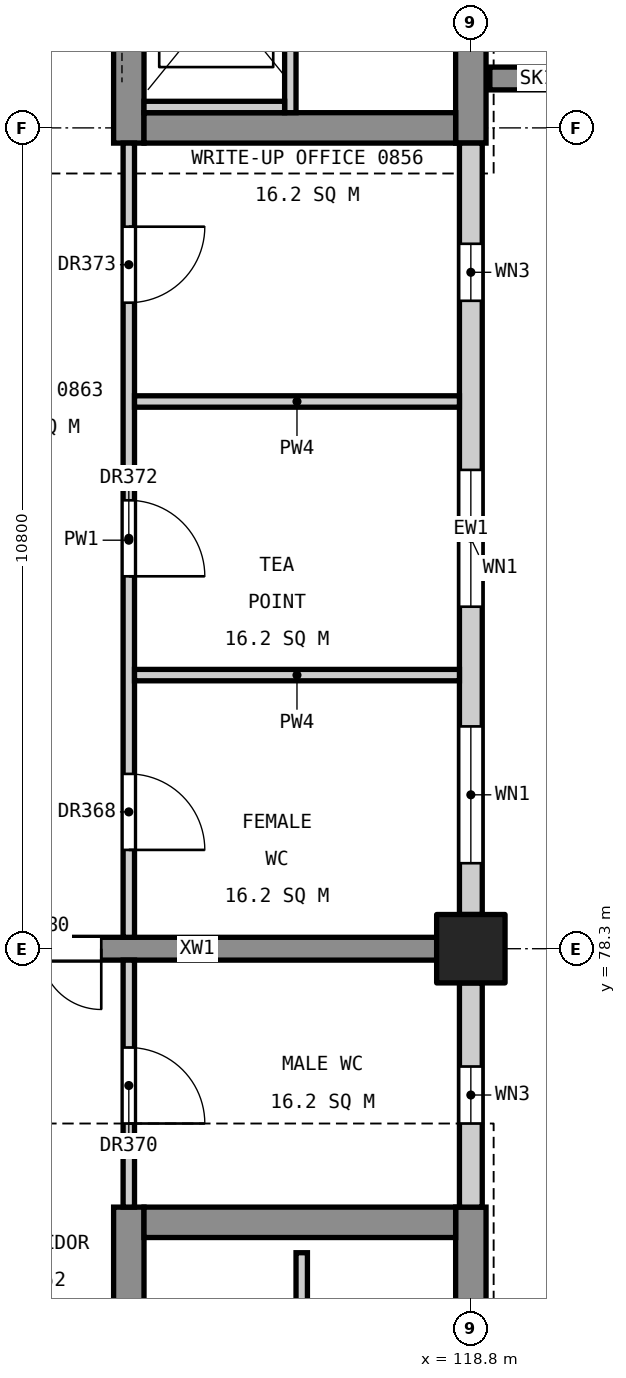
"""IFC4 building model, lengths in metres.
Left out: names, types, materials, properties, quantities, classifications, styles, units other than length and angle.
Written with IfcOpenShell. Run it as: python <this file> out.ifc"""

import sys

from ifc_helpers import new_model, si_unit, direction, frame, frame_2d, origin, origin_2d, place, context, subcontext, project, spatial, rectangle, extrude, element, fill, save


model = new_model("IFC4")
c1 = context("Model", 3, precision=1e-05, world=origin(), true_north=direction((0.0, 1.0)))
c2 = subcontext(c1, "Body", "Model", "MODEL_VIEW")
j1 = project(units=[si_unit("LENGTHUNIT", "METRE"), si_unit("PLANEANGLEUNIT", "RADIAN")], contexts=[c1])
p1 = place(None, origin())
s1 = spatial("IfcSite", under=j1, at=p1, CompositionType="ELEMENT")
p2 = place(p1, origin())
s2 = spatial("IfcBuilding", under=s1, at=p2, CompositionType="ELEMENT")
p3 = place(p2, frame((0.0, 0.0, 41.4)))
s3 = spatial("IfcBuildingStorey", under=s2, at=p3, CompositionType="ELEMENT", Elevation=41.4)
p4 = place(p3, frame((118.8, 78.3, 0.0), z_axis=(0.0, 0.0, 1.0), x_axis=(1.0, 0.0, 0.0)))
e1 = element("IfcColumn", 1, at=p4, inside=s3, PredefinedType="COLUMN", context=c2, shape_type="SweptSolid", body=[
    extrude(rectangle(XDim=0.9, YDim=0.9, at=origin_2d()), origin(), (0.0, 0.0, 1.0), 4.8),
])
p5 = place(p3, frame((118.8, 60.1, 0.0), z_axis=(0.0, 0.0, 1.0), x_axis=(0.0, 1.0, 0.0)))
e2 = element("IfcWall", 2, at=p5, inside=s3, PredefinedType="SHEAR", context=c2, shape_type="SweptSolid", body=[
    extrude(rectangle(XDim=14.8, YDim=0.4, at=frame_2d((7.4, 0.0))), origin(), (0.0, 0.0, 1.0), 4.55),
])
p6 = place(p5, frame((6.11, 0.0, 3.4)))
e3 = element("IfcOpeningElement", 3, at=p6, cuts=e2, PredefinedType="OPENING", context=c2, shape_type="SweptSolid", body=[
    extrude(rectangle(XDim=1.2, YDim=0.9, at=frame_2d((0.6, 0.45))), frame((0.0, 0.21, 0.0), z_axis=(0.0, -1.0, 0.0), x_axis=(1.0, 0.0, 0.0)), (0.0, 0.0, 1.0), 0.42),
])
p7 = place(p3, frame((114.3, 60.1, 0.0), z_axis=(0.0, 0.0, 1.0), x_axis=(0.0, 1.0, 0.0)))
e4 = element("IfcWall", 4, at=p7, inside=s3, PredefinedType="SHEAR", context=c2, shape_type="SweptSolid", body=[
    extrude(rectangle(XDim=14.8, YDim=0.4, at=frame_2d((7.4, 0.0))), origin(), (0.0, 0.0, 1.0), 4.55),
])
p8 = place(p7, frame((0.5, 0.0, 0.0)))
e5 = element("IfcOpeningElement", 5, at=p8, cuts=e4, PredefinedType="OPENING", context=c2, shape_type="SweptSolid", body=[
    extrude(rectangle(XDim=1.4, YDim=2.1, at=frame_2d((0.7, 1.05))), frame((0.0, 0.21, 0.0), z_axis=(0.0, -1.0, 0.0), x_axis=(1.0, 0.0, 0.0)), (0.0, 0.0, 1.0), 0.42),
])
p9 = place(p7, frame((8.8, 0.0, 0.0)))
e6 = element("IfcOpeningElement", 6, at=p9, cuts=e4, PredefinedType="OPENING", context=c2, shape_type="SweptSolid", body=[
    extrude(rectangle(XDim=1.1, YDim=2.1, at=frame_2d((0.55, 1.05))), frame((0.0, 0.21, 0.0), z_axis=(0.0, -1.0, 0.0), x_axis=(1.0, 0.0, 0.0)), (0.0, 0.0, 1.0), 0.42),
])
p10 = place(p7, frame((11.35, 0.0, 0.0)))
e7 = element("IfcOpeningElement", 7, at=p10, cuts=e4, PredefinedType="OPENING", context=c2, shape_type="SweptSolid", body=[
    extrude(rectangle(XDim=1.1, YDim=2.1, at=frame_2d((0.55, 1.05))), frame((0.0, 0.21, 0.0), z_axis=(0.0, -1.0, 0.0), x_axis=(1.0, 0.0, 0.0)), (0.0, 0.0, 1.0), 0.42),
])
p11 = place(p3, frame((118.6, 74.7, 0.0), z_axis=(0.0, 0.0, 1.0), x_axis=(-1.0, 0.0, 0.0)))
e8 = element("IfcWall", 8, at=p11, inside=s3, PredefinedType="SHEAR", context=c2, shape_type="SweptSolid", body=[
    extrude(rectangle(XDim=4.1, YDim=0.4, at=frame_2d((2.05, 0.0))), origin(), (0.0, 0.0, 1.0), 4.55),
])
p12 = place(p3, frame((118.8, 88.9, 0.0), z_axis=(0.0, 0.0, 1.0), x_axis=(0.0, 1.0, 0.0)))
e9 = element("IfcWall", 9, at=p12, inside=s3, PredefinedType="SHEAR", context=c2, shape_type="SweptSolid", body=[
    extrude(rectangle(XDim=11.2, YDim=0.4, at=frame_2d((5.6, 0.0))), origin(), (0.0, 0.0, 1.0), 4.55),
])
p13 = place(p12, frame((3.89, 0.0, 3.4)))
e10 = element("IfcOpeningElement", 10, at=p13, cuts=e9, PredefinedType="OPENING", context=c2, shape_type="SweptSolid", body=[
    extrude(rectangle(XDim=1.2, YDim=0.9, at=frame_2d((0.6, 0.45))), frame((0.0, 0.21, 0.0), z_axis=(0.0, -1.0, 0.0), x_axis=(1.0, 0.0, 0.0)), (0.0, 0.0, 1.0), 0.42),
])
p14 = place(p3, frame((114.3, 88.9, 0.0), z_axis=(0.0, 0.0, 1.0), x_axis=(0.0, 1.0, 0.0)))
e11 = element("IfcWall", 11, at=p14, inside=s3, PredefinedType="SHEAR", context=c2, shape_type="SweptSolid", body=[
    extrude(rectangle(XDim=11.2, YDim=0.4, at=frame_2d((5.6, 0.0))), origin(), (0.0, 0.0, 1.0), 4.55),
])
p15 = place(p14, frame((9.3, 0.0, 0.0)))
e12 = element("IfcOpeningElement", 12, at=p15, cuts=e11, PredefinedType="OPENING", context=c2, shape_type="SweptSolid", body=[
    extrude(rectangle(XDim=1.4, YDim=2.1, at=frame_2d((0.7, 1.05))), frame((0.0, 0.21, 0.0), z_axis=(0.0, -1.0, 0.0), x_axis=(1.0, 0.0, 0.0)), (0.0, 0.0, 1.0), 0.42),
])
p16 = place(p14, frame((1.35, 0.0, 0.0)))
e13 = element("IfcOpeningElement", 13, at=p16, cuts=e11, PredefinedType="OPENING", context=c2, shape_type="SweptSolid", body=[
    extrude(rectangle(XDim=1.1, YDim=2.1, at=frame_2d((0.55, 1.05))), frame((0.0, 0.21, 0.0), z_axis=(0.0, -1.0, 0.0), x_axis=(1.0, 0.0, 0.0)), (0.0, 0.0, 1.0), 0.42),
])
p17 = place(p3, frame((118.6, 89.1, 0.0), z_axis=(0.0, 0.0, 1.0), x_axis=(-1.0, 0.0, 0.0)))
e14 = element("IfcWall", 14, at=p17, inside=s3, PredefinedType="SHEAR", context=c2, shape_type="SweptSolid", body=[
    extrude(rectangle(XDim=4.1, YDim=0.4, at=frame_2d((2.05, 0.0))), origin(), (0.0, 0.0, 1.0), 4.55),
])
p18 = place(p3, frame((119.05, 89.75, 0.0), z_axis=(0.0, 0.0, 1.0), x_axis=(1.0, 0.0, 0.0)))
e15 = element("IfcWall", 15, at=p18, inside=s3, PredefinedType="SHEAR", context=c2, shape_type="SweptSolid", body=[
    extrude(rectangle(XDim=1.25, YDim=0.3, at=frame_2d((0.625, 0.0))), origin(), (0.0, 0.0, 1.0), 4.8),
])
p19 = place(p3, frame((118.35, 78.3, 0.0), z_axis=(0.0, 0.0, 1.0), x_axis=(-1.0, 0.0, 0.0)))
e16 = element("IfcWall", 16, at=p19, inside=s3, PredefinedType="SHEAR", context=c2, shape_type="SweptSolid", body=[
    extrude(rectangle(XDim=6.3, YDim=0.3, at=frame_2d((3.15, 0.0))), origin(), (0.0, 0.0, 1.0), 4.55),
])
p20 = place(p19, frame((4.413, 0.0, 0.0)))
e17 = element("IfcOpeningElement", 17, at=p20, cuts=e16, PredefinedType="OPENING", context=c2, shape_type="SweptSolid", body=[
    extrude(rectangle(XDim=1.6, YDim=2.1, at=frame_2d((0.8, 1.05))), frame((0.0, 0.16, 0.0), z_axis=(0.0, -1.0, 0.0), x_axis=(1.0, 0.0, 0.0)), (0.0, 0.0, 1.0), 0.32),
])
p21 = place(p3, frame((116.425, 92.0, 0.0), z_axis=(0.0, 0.0, 1.0), x_axis=(0.0, -1.0, 0.0)))
e18 = element("IfcWall", 18, at=p21, inside=s3, PredefinedType="SOLIDWALL", context=c2, shape_type="SweptSolid", body=[
    extrude(rectangle(XDim=2.7, YDim=0.15, at=frame_2d((1.35, 0.0))), origin(), (0.0, 0.0, 1.0), 4.55),
])
p22 = place(p3, frame((116.35, 89.375, 0.0), z_axis=(0.0, 0.0, 1.0), x_axis=(-1.0, 0.0, 0.0)))
e19 = element("IfcWall", 19, at=p22, inside=s3, PredefinedType="SOLIDWALL", context=c2, shape_type="SweptSolid", body=[
    extrude(rectangle(XDim=1.85, YDim=0.15, at=frame_2d((0.925, 0.0))), origin(), (0.0, 0.0, 1.0), 4.55),
])
p23 = place(p3, frame((116.575, 73.3, 0.0), z_axis=(0.0, 0.0, 1.0), x_axis=(0.0, 1.0, 0.0)))
e20 = element("IfcWall", 20, at=p23, inside=s3, PredefinedType="SOLIDWALL", context=c2, shape_type="SweptSolid", body=[
    extrude(rectangle(XDim=1.0, YDim=0.15, at=frame_2d((0.5, 0.0))), origin(), (0.0, 0.0, 1.0), 4.55),
])
p24 = place(p3, frame((118.8, 74.9, 0.0), z_axis=(0.0, 0.0, 1.0), x_axis=(0.0, 1.0, 0.0)))
e21 = element("IfcWall", 21, at=p24, inside=s3, PredefinedType="STANDARD", context=c2, shape_type="SweptSolid", body=[
    extrude(rectangle(XDim=2.95, YDim=0.3, at=frame_2d((1.475, 0.0))), origin(), (0.0, 0.0, 1.0), 3.65),
])
p25 = place(p24, frame((1.1, 0.0, 0.8)))
e22 = element("IfcOpeningElement", 22, at=p25, cuts=e21, PredefinedType="OPENING", context=c2, shape_type="SweptSolid", body=[
    extrude(rectangle(XDim=0.75, YDim=1.2, at=frame_2d((0.375, 0.6))), frame((0.0, 0.16, 0.0), z_axis=(0.0, -1.0, 0.0), x_axis=(1.0, 0.0, 0.0)), (0.0, 0.0, 1.0), 0.32),
])
p26 = place(p3, frame((118.8, 78.75, 0.0), z_axis=(0.0, 0.0, 1.0), x_axis=(0.0, 1.0, 0.0)))
e23 = element("IfcWall", 23, at=p26, inside=s3, PredefinedType="STANDARD", context=c2, shape_type="SweptSolid", body=[
    extrude(rectangle(XDim=10.15, YDim=0.3, at=frame_2d((5.075, 0.0))), origin(), (0.0, 0.0, 1.0), 3.65),
])
p27 = place(p26, frame((0.675, 0.0, 0.9)))
e24 = element("IfcOpeningElement", 24, at=p27, cuts=e23, PredefinedType="OPENING", context=c2, shape_type="SweptSolid", body=[
    extrude(rectangle(XDim=1.8, YDim=2.4, at=frame_2d((0.9, 1.2))), frame((0.0, 0.16, 0.0), z_axis=(0.0, -1.0, 0.0), x_axis=(1.0, 0.0, 0.0)), (0.0, 0.0, 1.0), 0.32),
])
p28 = place(p26, frame((4.05, 0.0, 0.9)))
e25 = element("IfcOpeningElement", 25, at=p28, cuts=e23, PredefinedType="OPENING", context=c2, shape_type="SweptSolid", body=[
    extrude(rectangle(XDim=1.8, YDim=2.4, at=frame_2d((0.9, 1.2))), frame((0.0, 0.16, 0.0), z_axis=(0.0, -1.0, 0.0), x_axis=(1.0, 0.0, 0.0)), (0.0, 0.0, 1.0), 0.32),
])
p29 = place(p26, frame((8.075, 0.0, 0.8)))
e26 = element("IfcOpeningElement", 26, at=p29, cuts=e23, PredefinedType="OPENING", context=c2, shape_type="SweptSolid", body=[
    extrude(rectangle(XDim=0.75, YDim=1.2, at=frame_2d((0.375, 0.6))), frame((0.0, 0.16, 0.0), z_axis=(0.0, -1.0, 0.0), x_axis=(1.0, 0.0, 0.0)), (0.0, 0.0, 1.0), 0.32),
])
p30 = place(p3, frame((114.3, 74.9, 0.0), z_axis=(0.0, 0.0, 1.0), x_axis=(0.0, 1.0, 0.0)))
e27 = element("IfcWall", 27, at=p30, inside=s3, PredefinedType="PARTITIONING", context=c2, shape_type="SweptSolid", body=[
    extrude(rectangle(XDim=3.25, YDim=0.15, at=frame_2d((1.625, 0.0))), origin(), (0.0, 0.0, 1.0), 3.55),
])
p31 = place(p30, frame((1.1, 0.0, 0.0)))
e28 = element("IfcOpeningElement", 28, at=p31, cuts=e27, PredefinedType="OPENING", context=c2, shape_type="SweptSolid", body=[
    extrude(rectangle(XDim=1.0, YDim=2.1, at=frame_2d((0.5, 1.05))), frame((0.0, 0.085, 0.0), z_axis=(0.0, -1.0, 0.0), x_axis=(1.0, 0.0, 0.0)), (0.0, 0.0, 1.0), 0.17),
])
p32 = place(p3, frame((114.3, 78.45, 0.0), z_axis=(0.0, 0.0, 1.0), x_axis=(0.0, 1.0, 0.0)))
e29 = element("IfcWall", 29, at=p32, inside=s3, PredefinedType="PARTITIONING", context=c2, shape_type="SweptSolid", body=[
    extrude(rectangle(XDim=10.45, YDim=0.15, at=frame_2d((5.225, 0.0))), origin(), (0.0, 0.0, 1.0), 3.55),
])
p33 = place(p32, frame((1.15, 0.0, 0.0)))
e30 = element("IfcOpeningElement", 30, at=p33, cuts=e29, PredefinedType="OPENING", context=c2, shape_type="SweptSolid", body=[
    extrude(rectangle(XDim=1.0, YDim=2.1, at=frame_2d((0.5, 1.05))), frame((0.0, 0.085, 0.0), z_axis=(0.0, -1.0, 0.0), x_axis=(1.0, 0.0, 0.0)), (0.0, 0.0, 1.0), 0.17),
])
p34 = place(p32, frame((4.75, 0.0, 0.0)))
e31 = element("IfcOpeningElement", 31, at=p34, cuts=e29, PredefinedType="OPENING", context=c2, shape_type="SweptSolid", body=[
    extrude(rectangle(XDim=1.0, YDim=2.1, at=frame_2d((0.5, 1.05))), frame((0.0, 0.085, 0.0), z_axis=(0.0, -1.0, 0.0), x_axis=(1.0, 0.0, 0.0)), (0.0, 0.0, 1.0), 0.17),
])
p35 = place(p32, frame((8.35, 0.0, 0.0)))
e32 = element("IfcOpeningElement", 32, at=p35, cuts=e29, PredefinedType="OPENING", context=c2, shape_type="SweptSolid", body=[
    extrude(rectangle(XDim=1.0, YDim=2.1, at=frame_2d((0.5, 1.05))), frame((0.0, 0.085, 0.0), z_axis=(0.0, -1.0, 0.0), x_axis=(1.0, 0.0, 0.0)), (0.0, 0.0, 1.0), 0.17),
])
for number, where, z_axis, x_axis in (
    (33, (118.65, 81.9, 0.0), (0.0, 0.0, 1.0), (-1.0, 0.0, 0.0)),
    (34, (118.65, 85.5, 0.0), (0.0, 0.0, 1.0), (-1.0, 0.0, 0.0)),
):
    element("IfcWall", number, at=place(p3, frame(where, z_axis=z_axis, x_axis=x_axis)), inside=s3, PredefinedType="PARTITIONING", context=c2, shape_type="SweptSolid", body=[
        extrude(rectangle(XDim=4.275, YDim=0.15, at=frame_2d((2.137, 0.0))), origin(), (0.0, 0.0, 1.0), 3.85),
    ])
p36 = place(p25, origin())
e35 = element("IfcWindow", 35, at=p36, inside=s3, PartitioningType="SINGLE_PANEL", PredefinedType="WINDOW", context=c2, shape_type="SweptSolid", body=[
    extrude(rectangle(XDim=0.75, YDim=1.2, at=frame_2d((0.375, 0.6))), frame((0.0, 0.03, 0.0), z_axis=(0.0, -1.0, 0.0), x_axis=(1.0, 0.0, 0.0)), (0.0, 0.0, 1.0), 0.06),
])
fill(e22, e35)
p37 = place(p27, origin())
e36 = element("IfcWindow", 36, at=p37, inside=s3, PartitioningType="SINGLE_PANEL", PredefinedType="WINDOW", context=c2, shape_type="SweptSolid", body=[
    extrude(rectangle(XDim=1.8, YDim=2.4, at=frame_2d((0.9, 1.2))), frame((0.0, 0.03, 0.0), z_axis=(0.0, -1.0, 0.0), x_axis=(1.0, 0.0, 0.0)), (0.0, 0.0, 1.0), 0.06),
])
fill(e24, e36)
p38 = place(p28, origin())
e37 = element("IfcWindow", 37, at=p38, inside=s3, PartitioningType="SINGLE_PANEL", PredefinedType="WINDOW", context=c2, shape_type="SweptSolid", body=[
    extrude(rectangle(XDim=1.8, YDim=2.4, at=frame_2d((0.9, 1.2))), frame((0.0, 0.03, 0.0), z_axis=(0.0, -1.0, 0.0), x_axis=(1.0, 0.0, 0.0)), (0.0, 0.0, 1.0), 0.06),
])
fill(e25, e37)
p39 = place(p29, origin())
e38 = element("IfcWindow", 38, at=p39, inside=s3, PartitioningType="SINGLE_PANEL", PredefinedType="WINDOW", context=c2, shape_type="SweptSolid", body=[
    extrude(rectangle(XDim=0.75, YDim=1.2, at=frame_2d((0.375, 0.6))), frame((0.0, 0.03, 0.0), z_axis=(0.0, -1.0, 0.0), x_axis=(1.0, 0.0, 0.0)), (0.0, 0.0, 1.0), 0.06),
])
fill(e26, e38)
p40 = place(p33, frame((1.0, 0.0, 0.0), z_axis=(0.0, 0.0, 1.0), x_axis=(-1.0, 0.0, 0.0)))
e39 = element("IfcDoor", 39, at=p40, inside=s3, OperationType="SINGLE_SWING_RIGHT", PredefinedType="DOOR", context=c2, shape_type="SweptSolid", body=[
    extrude(rectangle(XDim=1.0, YDim=2.1, at=frame_2d((0.5, 1.05))), frame((0.0, 0.025, 0.0), z_axis=(0.0, -1.0, 0.0), x_axis=(1.0, 0.0, 0.0)), (0.0, 0.0, 1.0), 0.05),
])
fill(e30, e39)
p41 = place(p31, frame((1.0, 0.0, 0.0), z_axis=(0.0, 0.0, 1.0), x_axis=(-1.0, 0.0, 0.0)))
e40 = element("IfcDoor", 40, at=p41, inside=s3, OperationType="SINGLE_SWING_RIGHT", PredefinedType="DOOR", context=c2, shape_type="SweptSolid", body=[
    extrude(rectangle(XDim=1.0, YDim=2.1, at=frame_2d((0.5, 1.05))), frame((0.0, 0.025, 0.0), z_axis=(0.0, -1.0, 0.0), x_axis=(1.0, 0.0, 0.0)), (0.0, 0.0, 1.0), 0.05),
])
fill(e28, e40)
p42 = place(p34, frame((1.0, 0.0, 0.0), z_axis=(0.0, 0.0, 1.0), x_axis=(-1.0, 0.0, 0.0)))
e41 = element("IfcDoor", 41, at=p42, inside=s3, OperationType="SINGLE_SWING_RIGHT", PredefinedType="DOOR", context=c2, shape_type="SweptSolid", body=[
    extrude(rectangle(XDim=1.0, YDim=2.1, at=frame_2d((0.5, 1.05))), frame((0.0, 0.025, 0.0), z_axis=(0.0, -1.0, 0.0), x_axis=(1.0, 0.0, 0.0)), (0.0, 0.0, 1.0), 0.05),
])
fill(e31, e41)
p43 = place(p35, frame((1.0, 0.0, 0.0), z_axis=(0.0, 0.0, 1.0), x_axis=(-1.0, 0.0, 0.0)))
e42 = element("IfcDoor", 42, at=p43, inside=s3, OperationType="SINGLE_SWING_LEFT", PredefinedType="DOOR", context=c2, shape_type="SweptSolid", body=[
    extrude(rectangle(XDim=1.0, YDim=2.1, at=frame_2d((0.5, 1.05))), frame((0.0, 0.025, 0.0), z_axis=(0.0, -1.0, 0.0), x_axis=(1.0, 0.0, 0.0)), (0.0, 0.0, 1.0), 0.05),
])
fill(e32, e42)
p44 = place(p20, origin())
e43 = element("IfcDoor", 43, at=p44, inside=s3, OperationType="DOUBLE_DOOR_SINGLE_SWING", PredefinedType="DOOR", context=c2, shape_type="SweptSolid", body=[
    extrude(rectangle(XDim=1.6, YDim=2.1, at=frame_2d((0.8, 1.05))), frame((0.0, 0.025, 0.0), z_axis=(0.0, -1.0, 0.0), x_axis=(1.0, 0.0, 0.0)), (0.0, 0.0, 1.0), 0.05),
])
fill(e17, e43)
save(model, sys.argv[1])
